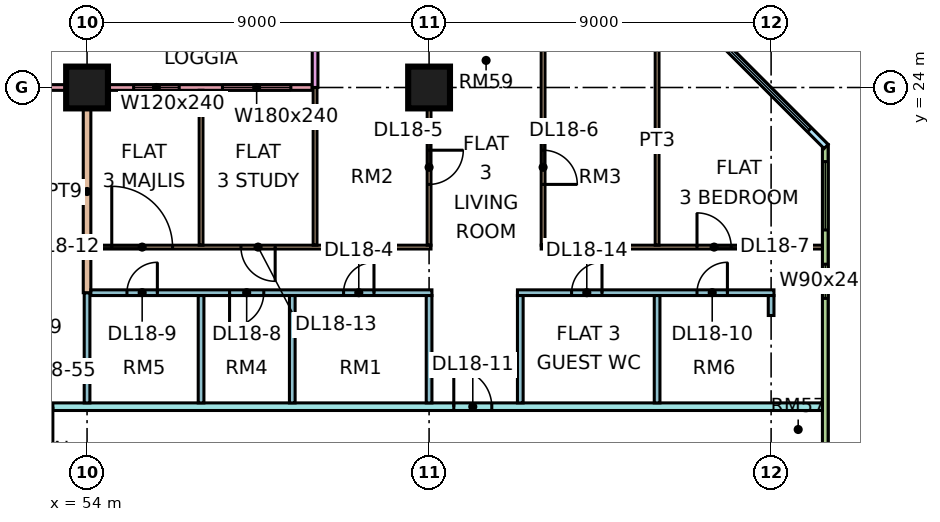
"""IFC4 building model, lengths in metres.
Left out: names, types, materials, properties, quantities, classifications, styles, units other than length and angle.
Written with IfcOpenShell. Run it as: python <this file> out.ifc"""

import sys

from ifc_helpers import new_model, si_unit, direction, frame, frame_2d, origin, origin_2d, place, context, subcontext, project, spatial, rectangle, extrude, element, fill, save


model = new_model("IFC4")
c1 = context("Model", 3, precision=1e-05, world=origin(), true_north=direction((0.0, 1.0)))
c2 = subcontext(c1, "Body", "Model", "MODEL_VIEW")
j1 = project(units=[si_unit("LENGTHUNIT", "METRE"), si_unit("PLANEANGLEUNIT", "RADIAN")], contexts=[c1])
p1 = place(None, origin())
s1 = spatial("IfcSite", under=j1, at=p1, CompositionType="ELEMENT")
p2 = place(p1, origin())
s2 = spatial("IfcBuilding", under=s1, at=p2, CompositionType="ELEMENT")
p3 = place(p2, frame((0.0, 0.0, 82.65)))
s3 = spatial("IfcBuildingStorey", under=s2, at=p3, CompositionType="ELEMENT", Elevation=82.65)
for number, where, z_axis, x_axis in (
    (1, (54.0, 24.0, 0.0), (0.0, 0.0, 1.0), (1.0, 0.0, 0.0)),
    (2, (63.0, 24.0, 0.0), (0.0, 0.0, 1.0), (1.0, 0.0, 0.0)),
):
    element("IfcColumn", number, at=place(p3, frame(where, z_axis=z_axis, x_axis=x_axis)), inside=s3, PredefinedType="COLUMN", context=c2, shape_type="SweptSolid", body=[
        extrude(rectangle(XDim=1.1, YDim=1.1, at=origin_2d()), origin(), (0.0, 0.0, 1.0), 3.75),
    ])
p4 = place(p3, frame((59.925, 24.0, 0.0), z_axis=(0.0, 0.0, 1.0), x_axis=(-1.0, 0.0, 0.0)))
e3 = element("IfcWall", 3, at=p4, inside=s3, PredefinedType="SOLIDWALL", context=c2, shape_type="SweptSolid", body=[
    extrude(rectangle(XDim=11.85, YDim=0.15, at=frame_2d((5.925, 0.0))), origin(), (0.0, 0.0, 1.0), 3.3),
])
p5 = place(p4, frame((0.562, 0.0, 0.45)))
e4 = element("IfcOpeningElement", 4, at=p5, cuts=e3, PredefinedType="OPENING", context=c2, shape_type="SweptSolid", body=[
    extrude(rectangle(XDim=1.8, YDim=2.4, at=frame_2d((0.9, 1.2))), frame((0.0, 0.085, 0.0), z_axis=(0.0, -1.0, 0.0), x_axis=(1.0, 0.0, 0.0)), (0.0, 0.0, 1.0), 0.17),
])
p6 = place(p4, frame((3.5, 0.0, 0.45)))
e5 = element("IfcOpeningElement", 5, at=p6, cuts=e3, PredefinedType="OPENING", context=c2, shape_type="SweptSolid", body=[
    extrude(rectangle(XDim=1.2, YDim=2.4, at=frame_2d((0.6, 1.2))), frame((0.0, 0.085, 0.0), z_axis=(0.0, -1.0, 0.0), x_axis=(1.0, 0.0, 0.0)), (0.0, 0.0, 1.0), 0.17),
])
p7 = place(p4, frame((7.113, 0.0, 0.45)))
e6 = element("IfcOpeningElement", 6, at=p7, cuts=e3, PredefinedType="OPENING", context=c2, shape_type="SweptSolid", body=[
    extrude(rectangle(XDim=4.2, YDim=2.4, at=frame_2d((2.1, 1.2))), frame((0.0, 0.085, 0.0), z_axis=(0.0, -1.0, 0.0), x_axis=(1.0, 0.0, 0.0)), (0.0, 0.0, 1.0), 0.17),
])
p8 = place(p3, frame((60.0, 25.5, 0.0), z_axis=(0.0, 0.0, 1.0), x_axis=(0.0, -1.0, 0.0)))
e7 = element("IfcWall", 7, at=p8, inside=s3, PredefinedType="SOLIDWALL", context=c2, shape_type="SweptSolid", body=[
    extrude(rectangle(XDim=1.5, YDim=0.15, at=frame_2d((0.75, 0.0))), origin(), (0.0, 0.0, 1.0), 3.3),
])
p9 = place(p3, frame((73.425, 12.075, 0.0), z_axis=(0.0, 0.0, 1.0), x_axis=(0.0, 1.0, 0.0)))
e8 = element("IfcWall", 8, at=p9, inside=s3, PredefinedType="SOLIDWALL", context=c2, shape_type="SweptSolid", body=[
    extrude(rectangle(XDim=10.425, YDim=0.15, at=frame_2d((5.212, 0.0))), origin(), (0.0, 0.0, 1.0), 3.3),
])
p10 = place(p9, frame((6.375, 0.0, 0.45)))
e9 = element("IfcOpeningElement", 9, at=p10, cuts=e8, PredefinedType="OPENING", context=c2, shape_type="SweptSolid", body=[
    extrude(rectangle(XDim=0.9, YDim=2.4, at=frame_2d((0.45, 1.2))), frame((0.0, 0.085, 0.0), z_axis=(0.0, -1.0, 0.0), x_axis=(1.0, 0.0, 0.0)), (0.0, 0.0, 1.0), 0.17),
])
p11 = place(p9, frame((8.175, 0.0, 0.45)))
e10 = element("IfcOpeningElement", 10, at=p11, cuts=e8, PredefinedType="OPENING", context=c2, shape_type="SweptSolid", body=[
    extrude(rectangle(XDim=1.8, YDim=2.4, at=frame_2d((0.9, 1.2))), frame((0.0, 0.085, 0.0), z_axis=(0.0, -1.0, 0.0), x_axis=(1.0, 0.0, 0.0)), (0.0, 0.0, 1.0), 0.17),
])
p12 = place(p3, frame((73.447, 22.447, 0.0), z_axis=(0.0, 0.0, 1.0), x_axis=(-0.707106781187, 0.707106781187, 0.0)))
e11 = element("IfcWall", 11, at=p12, inside=s3, PredefinedType="SOLIDWALL", context=c2, shape_type="SweptSolid", body=[
    extrude(rectangle(XDim=4.243, YDim=0.15, at=frame_2d((2.121, 0.0))), origin(), (0.0, 0.0, 1.0), 3.3),
])
p13 = place(p12, frame((0.621, 0.0, 0.45)))
e12 = element("IfcOpeningElement", 12, at=p13, cuts=e11, PredefinedType="OPENING", context=c2, shape_type="SweptSolid", body=[
    extrude(rectangle(XDim=3.0, YDim=2.4, at=frame_2d((1.5, 1.2))), frame((0.0, 0.085, 0.0), z_axis=(0.0, -1.0, 0.0), x_axis=(1.0, 0.0, 0.0)), (0.0, 0.0, 1.0), 0.17),
])
p14 = place(p3, frame((51.225, 15.6, 0.0), z_axis=(0.0, 0.0, 1.0), x_axis=(1.0, 0.0, 0.0)))
e13 = element("IfcWall", 13, at=p14, inside=s3, PredefinedType="PARTITIONING", context=c2, shape_type="SweptSolid", body=[
    extrude(rectangle(XDim=22.125, YDim=0.2, at=frame_2d((11.062, 0.0))), origin(), (0.0, 0.0, 1.0), 3.3),
])
p15 = place(p14, frame((12.425, 0.0, 0.0)))
e14 = element("IfcOpeningElement", 14, at=p15, cuts=e13, PredefinedType="OPENING", context=c2, shape_type="SweptSolid", body=[
    extrude(rectangle(XDim=1.0, YDim=2.1, at=frame_2d((0.5, 1.05))), frame((0.0, 0.11, 0.0), z_axis=(0.0, -1.0, 0.0), x_axis=(1.0, 0.0, 0.0)), (0.0, 0.0, 1.0), 0.22),
])
p16 = place(p14, frame((0.875, 0.0, 0.0)))
e15 = element("IfcOpeningElement", 15, at=p16, cuts=e13, PredefinedType="OPENING", context=c2, shape_type="SweptSolid", body=[
    extrude(rectangle(XDim=1.0, YDim=2.1, at=frame_2d((0.5, 1.05))), frame((0.0, 0.11, 0.0), z_axis=(0.0, -1.0, 0.0), x_axis=(1.0, 0.0, 0.0)), (0.0, 0.0, 1.0), 0.22),
])
p17 = place(p3, frame((54.0, 15.7, 0.0), z_axis=(0.0, 0.0, 1.0), x_axis=(0.0, 1.0, 0.0)))
e16 = element("IfcWall", 16, at=p17, inside=s3, PredefinedType="PARTITIONING", context=c2, shape_type="SweptSolid", body=[
    extrude(rectangle(XDim=2.9, YDim=0.15, at=frame_2d((1.45, 0.0))), origin(), (0.0, 0.0, 1.0), 3.3),
])
p18 = place(p3, frame((54.0, 18.6, 0.0), z_axis=(0.0, 0.0, 1.0), x_axis=(0.0, 1.0, 0.0)))
e17 = element("IfcWall", 17, at=p18, inside=s3, PredefinedType="PARTITIONING", context=c2, shape_type="SweptSolid", body=[
    extrude(rectangle(XDim=5.326, YDim=0.2, at=frame_2d((2.663, 0.0))), origin(), (0.0, 0.0, 1.0), 3.3),
])
p19 = place(p3, frame((54.1, 18.6, 0.0), z_axis=(0.0, 0.0, 1.0), x_axis=(1.0, 0.0, 0.0)))
e18 = element("IfcWall", 18, at=p19, inside=s3, PredefinedType="PARTITIONING", context=c2, shape_type="SweptSolid", body=[
    extrude(rectangle(XDim=8.975, YDim=0.15, at=frame_2d((4.487, 0.0))), origin(), (0.0, 0.0, 1.0), 3.3),
])
p20 = place(p19, frame((6.65, 0.0, 0.0)))
e19 = element("IfcOpeningElement", 19, at=p20, cuts=e18, PredefinedType="OPENING", context=c2, shape_type="SweptSolid", body=[
    extrude(rectangle(XDim=0.8, YDim=2.1, at=frame_2d((0.4, 1.05))), frame((0.0, 0.085, 0.0), z_axis=(0.0, -1.0, 0.0), x_axis=(1.0, 0.0, 0.0)), (0.0, 0.0, 1.0), 0.17),
])
p21 = place(p19, frame((3.65, 0.0, 0.0)))
e20 = element("IfcOpeningElement", 20, at=p21, cuts=e18, PredefinedType="OPENING", context=c2, shape_type="SweptSolid", body=[
    extrude(rectangle(XDim=0.9, YDim=2.1, at=frame_2d((0.45, 1.05))), frame((0.0, 0.085, 0.0), z_axis=(0.0, -1.0, 0.0), x_axis=(1.0, 0.0, 0.0)), (0.0, 0.0, 1.0), 0.17),
])
p22 = place(p19, frame((0.95, 0.0, 0.0)))
e21 = element("IfcOpeningElement", 21, at=p22, cuts=e18, PredefinedType="OPENING", context=c2, shape_type="SweptSolid", body=[
    extrude(rectangle(XDim=0.8, YDim=2.1, at=frame_2d((0.4, 1.05))), frame((0.0, 0.085, 0.0), z_axis=(0.0, -1.0, 0.0), x_axis=(1.0, 0.0, 0.0)), (0.0, 0.0, 1.0), 0.17),
])
p23 = place(p3, frame((54.1, 19.8, 0.0), z_axis=(0.0, 0.0, 1.0), x_axis=(1.0, 0.0, 0.0)))
e22 = element("IfcWall", 22, at=p23, inside=s3, PredefinedType="PARTITIONING", context=c2, shape_type="SweptSolid", body=[
    extrude(rectangle(XDim=8.95, YDim=0.1, at=frame_2d((4.475, 0.0))), origin(), (0.0, 0.0, 1.0), 3.3),
])
p24 = place(p23, frame((0.55, 0.0, 0.0)))
e23 = element("IfcOpeningElement", 23, at=p24, cuts=e22, PredefinedType="OPENING", context=c2, shape_type="SweptSolid", body=[
    extrude(rectangle(XDim=1.6, YDim=2.1, at=frame_2d((0.8, 1.05))), frame((0.0, 0.06, 0.0), z_axis=(0.0, -1.0, 0.0), x_axis=(1.0, 0.0, 0.0)), (0.0, 0.0, 1.0), 0.12),
])
p25 = place(p23, frame((3.95, 0.0, 0.0)))
e24 = element("IfcOpeningElement", 24, at=p25, cuts=e22, PredefinedType="OPENING", context=c2, shape_type="SweptSolid", body=[
    extrude(rectangle(XDim=0.9, YDim=2.1, at=frame_2d((0.45, 1.05))), frame((0.0, 0.06, 0.0), z_axis=(0.0, -1.0, 0.0), x_axis=(1.0, 0.0, 0.0)), (0.0, 0.0, 1.0), 0.12),
])
p26 = place(p3, frame((57.0, 15.7, 0.0), z_axis=(0.0, 0.0, 1.0), x_axis=(0.0, 1.0, 0.0)))
e25 = element("IfcWall", 25, at=p26, inside=s3, PredefinedType="PARTITIONING", context=c2, shape_type="SweptSolid", body=[
    extrude(rectangle(XDim=2.825, YDim=0.15, at=frame_2d((1.413, 0.0))), origin(), (0.0, 0.0, 1.0), 3.3),
])
p27 = place(p3, frame((57.0, 19.85, 0.0), z_axis=(0.0, 0.0, 1.0), x_axis=(0.0, 1.0, 0.0)))
e26 = element("IfcWall", 26, at=p27, inside=s3, PredefinedType="PARTITIONING", context=c2, shape_type="SweptSolid", body=[
    extrude(rectangle(XDim=4.076, YDim=0.1, at=frame_2d((2.038, 0.0))), origin(), (0.0, 0.0, 1.0), 3.3),
])
p28 = place(p3, frame((59.4, 15.7, 0.0), z_axis=(0.0, 0.0, 1.0), x_axis=(0.0, 1.0, 0.0)))
e27 = element("IfcWall", 27, at=p28, inside=s3, PredefinedType="PARTITIONING", context=c2, shape_type="SweptSolid", body=[
    extrude(rectangle(XDim=2.825, YDim=0.15, at=frame_2d((1.413, 0.0))), origin(), (0.0, 0.0, 1.0), 3.3),
])
p29 = place(p3, frame((60.0, 19.85, 0.0), z_axis=(0.0, 0.0, 1.0), x_axis=(0.0, 1.0, 0.0)))
e28 = element("IfcWall", 28, at=p29, inside=s3, PredefinedType="PARTITIONING", context=c2, shape_type="SweptSolid", body=[
    extrude(rectangle(XDim=4.15, YDim=0.1, at=frame_2d((2.075, 0.0))), origin(), (0.0, 0.0, 1.0), 3.3),
])
p30 = place(p3, frame((63.0, 15.7, 0.0), z_axis=(0.0, 0.0, 1.0), x_axis=(0.0, 1.0, 0.0)))
e29 = element("IfcWall", 29, at=p30, inside=s3, PredefinedType="PARTITIONING", context=c2, shape_type="SweptSolid", body=[
    extrude(rectangle(XDim=2.825, YDim=0.15, at=frame_2d((1.413, 0.0))), origin(), (0.0, 0.0, 1.0), 3.3),
])
p31 = place(p3, frame((63.0, 19.85, 0.0), z_axis=(0.0, 0.0, 1.0), x_axis=(0.0, 1.0, 0.0)))
e30 = element("IfcWall", 30, at=p31, inside=s3, PredefinedType="PARTITIONING", context=c2, shape_type="SweptSolid", body=[
    extrude(rectangle(XDim=4.15, YDim=0.1, at=frame_2d((2.075, 0.0))), origin(), (0.0, 0.0, 1.0), 3.3),
])
p32 = place(p31, frame((1.6, 0.0, 0.0)))
e31 = element("IfcOpeningElement", 31, at=p32, cuts=e30, PredefinedType="OPENING", context=c2, shape_type="SweptSolid", body=[
    extrude(rectangle(XDim=0.9, YDim=2.1, at=frame_2d((0.45, 1.05))), frame((0.0, 0.06, 0.0), z_axis=(0.0, -1.0, 0.0), x_axis=(1.0, 0.0, 0.0)), (0.0, 0.0, 1.0), 0.12),
])
p33 = place(p3, frame((65.325, 18.6, 0.0), z_axis=(0.0, 0.0, 1.0), x_axis=(1.0, 0.0, 0.0)))
e32 = element("IfcWall", 32, at=p33, inside=s3, PredefinedType="PARTITIONING", context=c2, shape_type="SweptSolid", body=[
    extrude(rectangle(XDim=6.75, YDim=0.15, at=frame_2d((3.375, 0.0))), origin(), (0.0, 0.0, 1.0), 3.3),
])
p34 = place(p33, frame((4.725, 0.0, 0.0)))
e33 = element("IfcOpeningElement", 33, at=p34, cuts=e32, PredefinedType="OPENING", context=c2, shape_type="SweptSolid", body=[
    extrude(rectangle(XDim=0.8, YDim=2.1, at=frame_2d((0.4, 1.05))), frame((0.0, 0.085, 0.0), z_axis=(0.0, -1.0, 0.0), x_axis=(1.0, 0.0, 0.0)), (0.0, 0.0, 1.0), 0.17),
])
p35 = place(p33, frame((1.425, 0.0, 0.0)))
e34 = element("IfcOpeningElement", 34, at=p35, cuts=e32, PredefinedType="OPENING", context=c2, shape_type="SweptSolid", body=[
    extrude(rectangle(XDim=0.8, YDim=2.1, at=frame_2d((0.4, 1.05))), frame((0.0, 0.085, 0.0), z_axis=(0.0, -1.0, 0.0), x_axis=(1.0, 0.0, 0.0)), (0.0, 0.0, 1.0), 0.17),
])
p36 = place(p3, frame((65.4, 15.7, 0.0), z_axis=(0.0, 0.0, 1.0), x_axis=(0.0, 1.0, 0.0)))
e35 = element("IfcWall", 35, at=p36, inside=s3, PredefinedType="PARTITIONING", context=c2, shape_type="SweptSolid", body=[
    extrude(rectangle(XDim=2.825, YDim=0.15, at=frame_2d((1.413, 0.0))), origin(), (0.0, 0.0, 1.0), 3.3),
])
p37 = place(p3, frame((65.95, 19.8, 0.0), z_axis=(0.0, 0.0, 1.0), x_axis=(1.0, 0.0, 0.0)))
e36 = element("IfcWall", 36, at=p37, inside=s3, PredefinedType="PARTITIONING", context=c2, shape_type="SweptSolid", body=[
    extrude(rectangle(XDim=7.401, YDim=0.1, at=frame_2d((3.701, 0.0))), origin(), (0.0, 0.0, 1.0), 3.3),
])
p38 = place(p37, frame((4.1, 0.0, 0.0)))
e37 = element("IfcOpeningElement", 37, at=p38, cuts=e36, PredefinedType="OPENING", context=c2, shape_type="SweptSolid", body=[
    extrude(rectangle(XDim=0.9, YDim=2.1, at=frame_2d((0.45, 1.05))), frame((0.0, 0.06, 0.0), z_axis=(0.0, -1.0, 0.0), x_axis=(1.0, 0.0, 0.0)), (0.0, 0.0, 1.0), 0.12),
])
p39 = place(p3, frame((66.0, 19.85, 0.0), z_axis=(0.0, 0.0, 1.0), x_axis=(0.0, 1.0, 0.0)))
e38 = element("IfcWall", 38, at=p39, inside=s3, PredefinedType="PARTITIONING", context=c2, shape_type="SweptSolid", body=[
    extrude(rectangle(XDim=5.5, YDim=0.1, at=frame_2d((2.75, 0.0))), origin(), (0.0, 0.0, 1.0), 3.3),
])
p40 = place(p39, frame((1.6, 0.0, 0.0)))
e39 = element("IfcOpeningElement", 39, at=p40, cuts=e38, PredefinedType="OPENING", context=c2, shape_type="SweptSolid", body=[
    extrude(rectangle(XDim=0.9, YDim=2.1, at=frame_2d((0.45, 1.05))), frame((0.0, 0.06, 0.0), z_axis=(0.0, -1.0, 0.0), x_axis=(1.0, 0.0, 0.0)), (0.0, 0.0, 1.0), 0.12),
])
p41 = place(p3, frame((69.0, 15.7, 0.0), z_axis=(0.0, 0.0, 1.0), x_axis=(0.0, 1.0, 0.0)))
e40 = element("IfcWall", 40, at=p41, inside=s3, PredefinedType="PARTITIONING", context=c2, shape_type="SweptSolid", body=[
    extrude(rectangle(XDim=2.825, YDim=0.15, at=frame_2d((1.413, 0.0))), origin(), (0.0, 0.0, 1.0), 3.3),
])
p42 = place(p3, frame((69.0, 19.85, 0.0), z_axis=(0.0, 0.0, 1.0), x_axis=(0.0, 1.0, 0.0)))
e41 = element("IfcWall", 41, at=p42, inside=s3, PredefinedType="PARTITIONING", context=c2, shape_type="SweptSolid", body=[
    extrude(rectangle(XDim=5.501, YDim=0.1, at=frame_2d((2.75, 0.0))), origin(), (0.0, 0.0, 1.0), 3.3),
])
p43 = place(p3, frame((72.0, 18.0, 0.0), z_axis=(0.0, 0.0, 1.0), x_axis=(0.0, 1.0, 0.0)))
e42 = element("IfcWall", 42, at=p43, inside=s3, PredefinedType="PARTITIONING", context=c2, shape_type="SweptSolid", body=[
    extrude(rectangle(XDim=0.525, YDim=0.15, at=frame_2d((0.262, 0.0))), origin(), (0.0, 0.0, 1.0), 3.3),
])
p44 = place(p5, origin())
e43 = element("IfcWindow", 43, at=p44, inside=s3, PartitioningType="SINGLE_PANEL", PredefinedType="WINDOW", context=c2, shape_type="SweptSolid", body=[
    extrude(rectangle(XDim=1.8, YDim=2.4, at=frame_2d((0.9, 1.2))), frame((0.0, 0.03, 0.0), z_axis=(0.0, -1.0, 0.0), x_axis=(1.0, 0.0, 0.0)), (0.0, 0.0, 1.0), 0.06),
])
fill(e4, e43)
p45 = place(p6, origin())
e44 = element("IfcWindow", 44, at=p45, inside=s3, PartitioningType="SINGLE_PANEL", PredefinedType="WINDOW", context=c2, shape_type="SweptSolid", body=[
    extrude(rectangle(XDim=1.2, YDim=2.4, at=frame_2d((0.6, 1.2))), frame((0.0, 0.03, 0.0), z_axis=(0.0, -1.0, 0.0), x_axis=(1.0, 0.0, 0.0)), (0.0, 0.0, 1.0), 0.06),
])
fill(e5, e44)
p46 = place(p10, origin())
e45 = element("IfcWindow", 45, at=p46, inside=s3, PartitioningType="SINGLE_PANEL", PredefinedType="WINDOW", context=c2, shape_type="SweptSolid", body=[
    extrude(rectangle(XDim=0.9, YDim=2.4, at=frame_2d((0.45, 1.2))), frame((0.0, 0.03, 0.0), z_axis=(0.0, -1.0, 0.0), x_axis=(1.0, 0.0, 0.0)), (0.0, 0.0, 1.0), 0.06),
])
fill(e9, e45)
p47 = place(p11, origin())
e46 = element("IfcWindow", 46, at=p47, inside=s3, PartitioningType="SINGLE_PANEL", PredefinedType="WINDOW", context=c2, shape_type="SweptSolid", body=[
    extrude(rectangle(XDim=1.8, YDim=2.4, at=frame_2d((0.9, 1.2))), frame((0.0, 0.03, 0.0), z_axis=(0.0, -1.0, 0.0), x_axis=(1.0, 0.0, 0.0)), (0.0, 0.0, 1.0), 0.06),
])
fill(e10, e46)
p48 = place(p13, origin())
e47 = element("IfcWindow", 47, at=p48, inside=s3, PartitioningType="SINGLE_PANEL", PredefinedType="WINDOW", context=c2, shape_type="SweptSolid", body=[
    extrude(rectangle(XDim=3.0, YDim=2.4, at=frame_2d((1.5, 1.2))), frame((0.0, 0.03, 0.0), z_axis=(0.0, -1.0, 0.0), x_axis=(1.0, 0.0, 0.0)), (0.0, 0.0, 1.0), 0.06),
])
fill(e12, e47)
p49 = place(p20, frame((0.8, 0.0, 0.0), z_axis=(0.0, 0.0, 1.0), x_axis=(-1.0, 0.0, 0.0)))
e48 = element("IfcDoor", 48, at=p49, inside=s3, OperationType="SINGLE_SWING_RIGHT", PredefinedType="DOOR", context=c2, shape_type="SweptSolid", body=[
    extrude(rectangle(XDim=0.8, YDim=2.1, at=frame_2d((0.4, 1.05))), frame((0.0, 0.025, 0.0), z_axis=(0.0, -1.0, 0.0), x_axis=(1.0, 0.0, 0.0)), (0.0, 0.0, 1.0), 0.05),
])
fill(e19, e48)
p50 = place(p32, origin())
e49 = element("IfcDoor", 49, at=p50, inside=s3, OperationType="SINGLE_SWING_RIGHT", PredefinedType="DOOR", context=c2, shape_type="SweptSolid", body=[
    extrude(rectangle(XDim=0.9, YDim=2.1, at=frame_2d((0.45, 1.05))), frame((0.0, 0.025, 0.0), z_axis=(0.0, -1.0, 0.0), x_axis=(1.0, 0.0, 0.0)), (0.0, 0.0, 1.0), 0.05),
])
fill(e31, e49)
p51 = place(p40, frame((0.9, 0.0, 0.0), z_axis=(0.0, 0.0, 1.0), x_axis=(-1.0, 0.0, 0.0)))
e50 = element("IfcDoor", 50, at=p51, inside=s3, OperationType="SINGLE_SWING_LEFT", PredefinedType="DOOR", context=c2, shape_type="SweptSolid", body=[
    extrude(rectangle(XDim=0.9, YDim=2.1, at=frame_2d((0.45, 1.05))), frame((0.0, 0.025, 0.0), z_axis=(0.0, -1.0, 0.0), x_axis=(1.0, 0.0, 0.0)), (0.0, 0.0, 1.0), 0.05),
])
fill(e39, e50)
p52 = place(p38, origin())
e51 = element("IfcDoor", 51, at=p52, inside=s3, OperationType="SINGLE_SWING_LEFT", PredefinedType="DOOR", context=c2, shape_type="SweptSolid", body=[
    extrude(rectangle(XDim=0.9, YDim=2.1, at=frame_2d((0.45, 1.05))), frame((0.0, 0.025, 0.0), z_axis=(0.0, -1.0, 0.0), x_axis=(1.0, 0.0, 0.0)), (0.0, 0.0, 1.0), 0.05),
])
fill(e37, e51)
p53 = place(p21, frame((0.9, 0.0, 0.0), z_axis=(0.0, 0.0, 1.0), x_axis=(-1.0, 0.0, 0.0)))
e52 = element("IfcDoor", 52, at=p53, inside=s3, OperationType="SINGLE_SWING_LEFT", PredefinedType="DOOR", context=c2, shape_type="SweptSolid", body=[
    extrude(rectangle(XDim=0.9, YDim=2.1, at=frame_2d((0.45, 1.05))), frame((0.0, 0.025, 0.0), z_axis=(0.0, -1.0, 0.0), x_axis=(1.0, 0.0, 0.0)), (0.0, 0.0, 1.0), 0.05),
])
fill(e20, e52)
p54 = place(p22, frame((0.8, 0.0, 0.0), z_axis=(0.0, 0.0, 1.0), x_axis=(-1.0, 0.0, 0.0)))
e53 = element("IfcDoor", 53, at=p54, inside=s3, OperationType="SINGLE_SWING_RIGHT", PredefinedType="DOOR", context=c2, shape_type="SweptSolid", body=[
    extrude(rectangle(XDim=0.8, YDim=2.1, at=frame_2d((0.4, 1.05))), frame((0.0, 0.025, 0.0), z_axis=(0.0, -1.0, 0.0), x_axis=(1.0, 0.0, 0.0)), (0.0, 0.0, 1.0), 0.05),
])
fill(e21, e53)
p55 = place(p34, frame((0.8, 0.0, 0.0), z_axis=(0.0, 0.0, 1.0), x_axis=(-1.0, 0.0, 0.0)))
e54 = element("IfcDoor", 54, at=p55, inside=s3, OperationType="SINGLE_SWING_RIGHT", PredefinedType="DOOR", context=c2, shape_type="SweptSolid", body=[
    extrude(rectangle(XDim=0.8, YDim=2.1, at=frame_2d((0.4, 1.05))), frame((0.0, 0.025, 0.0), z_axis=(0.0, -1.0, 0.0), x_axis=(1.0, 0.0, 0.0)), (0.0, 0.0, 1.0), 0.05),
])
fill(e33, e54)
p56 = place(p15, origin())
e55 = element("IfcDoor", 55, at=p56, inside=s3, OperationType="SINGLE_SWING_LEFT", PredefinedType="DOOR", context=c2, shape_type="SweptSolid", body=[
    extrude(rectangle(XDim=1.0, YDim=2.1, at=frame_2d((0.5, 1.05))), frame((0.0, 0.025, 0.0), z_axis=(0.0, -1.0, 0.0), x_axis=(1.0, 0.0, 0.0)), (0.0, 0.0, 1.0), 0.05),
])
fill(e14, e55)
p57 = place(p24, origin())
e56 = element("IfcDoor", 56, at=p57, inside=s3, OperationType="DOUBLE_DOOR_SINGLE_SWING", PredefinedType="DOOR", context=c2, shape_type="SweptSolid", body=[
    extrude(rectangle(XDim=1.6, YDim=2.1, at=frame_2d((0.8, 1.05))), frame((0.0, 0.025, 0.0), z_axis=(0.0, -1.0, 0.0), x_axis=(1.0, 0.0, 0.0)), (0.0, 0.0, 1.0), 0.05),
])
fill(e23, e56)
p58 = place(p25, origin())
e57 = element("IfcDoor", 57, at=p58, inside=s3, OperationType="SINGLE_SWING_RIGHT", PredefinedType="DOOR", context=c2, shape_type="SweptSolid", body=[
    extrude(rectangle(XDim=0.9, YDim=2.1, at=frame_2d((0.45, 1.05))), frame((0.0, 0.025, 0.0), z_axis=(0.0, -1.0, 0.0), x_axis=(1.0, 0.0, 0.0)), (0.0, 0.0, 1.0), 0.05),
])
fill(e24, e57)
p59 = place(p35, frame((0.8, 0.0, 0.0), z_axis=(0.0, 0.0, 1.0), x_axis=(-1.0, 0.0, 0.0)))
e58 = element("IfcDoor", 58, at=p59, inside=s3, OperationType="SINGLE_SWING_RIGHT", PredefinedType="DOOR", context=c2, shape_type="SweptSolid", body=[
    extrude(rectangle(XDim=0.8, YDim=2.1, at=frame_2d((0.4, 1.05))), frame((0.0, 0.025, 0.0), z_axis=(0.0, -1.0, 0.0), x_axis=(1.0, 0.0, 0.0)), (0.0, 0.0, 1.0), 0.05),
])
fill(e34, e58)
p60 = place(p16, origin())
e59 = element("IfcDoor", 59, at=p60, inside=s3, OperationType="SINGLE_SWING_RIGHT", PredefinedType="DOOR", context=c2, shape_type="SweptSolid", body=[
    extrude(rectangle(XDim=1.0, YDim=2.1, at=frame_2d((0.5, 1.05))), frame((0.0, 0.025, 0.0), z_axis=(0.0, -1.0, 0.0), x_axis=(1.0, 0.0, 0.0)), (0.0, 0.0, 1.0), 0.05),
])
fill(e15, e59)
save(model, sys.argv[1])
